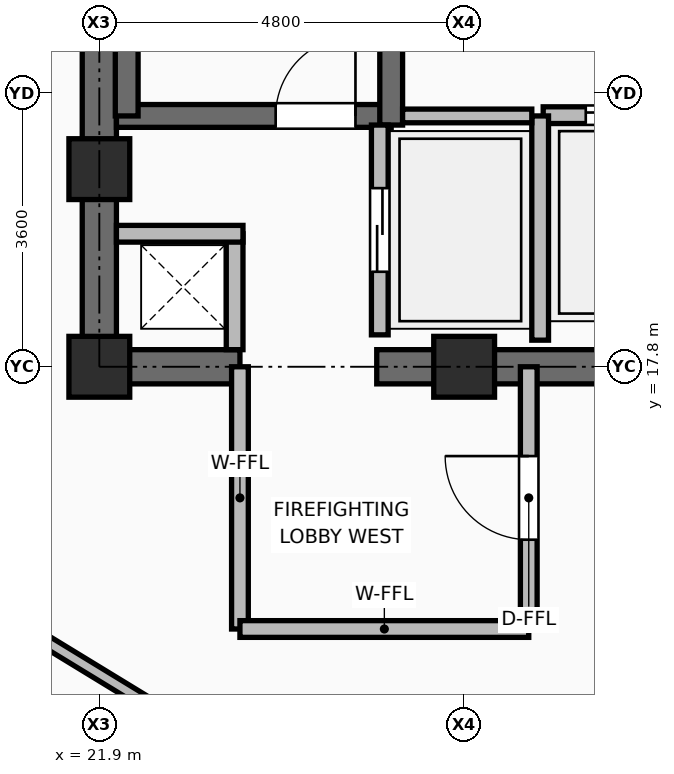
"""IFC4 building model, lengths in metres.
Left out: names, types, materials, properties, quantities, classifications, styles, units other than length and angle.
Written with IfcOpenShell. Run it as: python <this file> out.ifc"""

import sys

from ifc_helpers import new_model, si_unit, direction, frame, frame_2d, origin, origin_2d, place, context, subcontext, project, spatial, rectangle, extrude, element, fill, save


model = new_model("IFC4")
c1 = context("Model", 3, precision=1e-05, world=origin(), true_north=direction((0.0, 1.0)))
c2 = subcontext(c1, "Body", "Model", "MODEL_VIEW")
j1 = project(units=[si_unit("LENGTHUNIT", "METRE"), si_unit("PLANEANGLEUNIT", "RADIAN")], contexts=[c1])
p1 = place(None, origin())
s1 = spatial("IfcSite", under=j1, at=p1, CompositionType="ELEMENT")
p2 = place(p1, origin())
s2 = spatial("IfcBuilding", under=s1, at=p2, CompositionType="ELEMENT")
p3 = place(p2, frame((0.0, 0.0, 212.4)))
s3 = spatial("IfcBuildingStorey", under=s2, at=p3, CompositionType="ELEMENT", Elevation=212.4)
for number, where, z_axis, x_axis in (
    (1, (21.9, 17.8, 0.0), (0.0, 0.0, 1.0), (1.0, 0.0, 0.0)),
    (2, (26.7, 17.8, 0.0), (0.0, 0.0, 1.0), (1.0, 0.0, 0.0)),
    (3, (21.9, 20.4, 0.0), (0.0, 0.0, 1.0), (1.0, 0.0, 0.0)),
):
    element("IfcColumn", number, at=place(p3, frame(where, z_axis=z_axis, x_axis=x_axis)), inside=s3, PredefinedType="COLUMN", context=c2, shape_type="SweptSolid", body=[
        extrude(rectangle(XDim=0.8, YDim=0.8, at=origin_2d()), origin(), (0.0, 0.0, 1.0), 3.75),
    ])
p4 = place(p3, frame((21.675, 17.8, 0.0), z_axis=(0.0, 0.0, 1.0), x_axis=(1.0, 0.0, 0.0)))
e4 = element("IfcWall", 4, at=p4, inside=s3, PredefinedType="SHEAR", context=c2, shape_type="SweptSolid", body=[
    extrude(rectangle(XDim=2.075, YDim=0.45, at=frame_2d((1.038, 0.0))), origin(), (0.0, 0.0, 1.0), 3.57),
])
p5 = place(p3, frame((25.55, 17.8, 0.0), z_axis=(0.0, 0.0, 1.0), x_axis=(1.0, 0.0, 0.0)))
e5 = element("IfcWall", 5, at=p5, inside=s3, PredefinedType="SHEAR", context=c2, shape_type="SweptSolid", body=[
    extrude(rectangle(XDim=6.9, YDim=0.45, at=frame_2d((3.45, 0.0))), origin(), (0.0, 0.0, 1.0), 3.57),
])
p6 = place(p3, frame((21.9, 18.025, 0.0), z_axis=(0.0, 0.0, 1.0), x_axis=(0.0, 1.0, 0.0)))
e6 = element("IfcWall", 6, at=p6, inside=s3, PredefinedType="SHEAR", context=c2, shape_type="SweptSolid", body=[
    extrude(rectangle(XDim=14.2, YDim=0.45, at=frame_2d((7.1, 0.0))), origin(), (0.0, 0.0, 1.0), 3.57),
])
p7 = place(p3, frame((22.125, 21.1, 0.0), z_axis=(0.0, 0.0, 1.0), x_axis=(1.0, 0.0, 0.0)))
e7 = element("IfcWall", 7, at=p7, inside=s3, PredefinedType="SHEAR", context=c2, shape_type="SweptSolid", body=[
    extrude(rectangle(XDim=3.615, YDim=0.3, at=frame_2d((1.808, 0.0))), origin(), (0.0, 0.0, 1.0), 3.57),
])
p8 = place(p7, frame((2.095, 0.0, 0.0)))
e8 = element("IfcOpeningElement", 8, at=p8, cuts=e7, PredefinedType="OPENING", context=c2, shape_type="SweptSolid", body=[
    extrude(rectangle(XDim=1.05, YDim=2.1, at=frame_2d((0.525, 1.05))), frame((0.0, 0.16, 0.0), z_axis=(0.0, -1.0, 0.0), x_axis=(1.0, 0.0, 0.0)), (0.0, 0.0, 1.0), 0.32),
])
p9 = place(p3, frame((25.74, 20.98, 0.0), z_axis=(0.0, 0.0, 1.0), x_axis=(0.0, 1.0, 0.0)))
e9 = element("IfcWall", 9, at=p9, inside=s3, PredefinedType="SHEAR", context=c2, shape_type="SweptSolid", body=[
    extrude(rectangle(XDim=7.99, YDim=0.3, at=frame_2d((3.995, 0.0))), origin(), (0.0, 0.0, 1.0), 3.57),
])
p10 = place(p3, frame((22.26, 21.1, 0.0), z_axis=(0.0, 0.0, 1.0), x_axis=(0.0, 1.0, 0.0)))
e10 = element("IfcWall", 10, at=p10, inside=s3, PredefinedType="SHEAR", context=c2, shape_type="SweptSolid", body=[
    extrude(rectangle(XDim=7.75, YDim=0.3, at=frame_2d((3.875, 0.0))), origin(), (0.0, 0.0, 1.0), 3.57),
])
p11 = place(p3, frame((23.68, 18.025, 0.0), z_axis=(0.0, 0.0, 1.0), x_axis=(0.0, 1.0, 0.0)))
e11 = element("IfcWall", 11, at=p11, inside=s3, PredefinedType="PARTITIONING", context=c2, shape_type="SweptSolid", body=[
    extrude(rectangle(XDim=1.525, YDim=0.22, at=frame_2d((0.763, 0.0))), origin(), (0.0, 0.0, 1.0), 3.55),
])
p12 = place(p3, frame((22.125, 19.55, 0.0), z_axis=(0.0, 0.0, 1.0), x_axis=(1.0, 0.0, 0.0)))
e12 = element("IfcWall", 12, at=p12, inside=s3, PredefinedType="PARTITIONING", context=c2, shape_type="SweptSolid", body=[
    extrude(rectangle(XDim=1.665, YDim=0.22, at=frame_2d((0.833, 0.0))), origin(), (0.0, 0.0, 1.0), 2.595),
])
p13 = place(p3, frame((25.59, 18.22, 0.0), z_axis=(0.0, 0.0, 1.0), x_axis=(0.0, 1.0, 0.0)))
e13 = element("IfcWall", 13, at=p13, inside=s3, PredefinedType="PARTITIONING", context=c2, shape_type="SweptSolid", body=[
    extrude(rectangle(XDim=2.76, YDim=0.22, at=frame_2d((1.38, 0.0))), origin(), (0.0, 0.0, 1.0), 3.55),
])
p14 = place(p13, frame((0.83, 0.0, 0.0)))
e14 = element("IfcOpeningElement", 14, at=p14, cuts=e13, PredefinedType="OPENING", context=c2, shape_type="SweptSolid", body=[
    extrude(rectangle(XDim=1.1, YDim=2.2, at=frame_2d((0.55, 1.1))), frame((0.0, 0.12, 0.0), z_axis=(0.0, -1.0, 0.0), x_axis=(1.0, 0.0, 0.0)), (0.0, 0.0, 1.0), 0.24),
])
p15 = place(p3, frame((27.74, 21.11, 0.0), z_axis=(0.0, 0.0, 1.0), x_axis=(1.0, 0.0, 0.0)))
e15 = element("IfcWall", 15, at=p15, inside=s3, PredefinedType="PARTITIONING", context=c2, shape_type="SweptSolid", body=[
    extrude(rectangle(XDim=2.22, YDim=0.22, at=frame_2d((1.11, 0.0))), origin(), (0.0, 0.0, 1.0), 3.55),
])
p16 = place(p15, frame((0.56, 0.0, 0.0)))
e16 = element("IfcOpeningElement", 16, at=p16, cuts=e15, PredefinedType="OPENING", context=c2, shape_type="SweptSolid", body=[
    extrude(rectangle(XDim=1.1, YDim=2.2, at=frame_2d((0.55, 1.1))), frame((0.0, 0.12, 0.0), z_axis=(0.0, -1.0, 0.0), x_axis=(1.0, 0.0, 0.0)), (0.0, 0.0, 1.0), 0.24),
])
p17 = place(p3, frame((27.7, 18.15, 0.0), z_axis=(0.0, 0.0, 1.0), x_axis=(0.0, 1.0, 0.0)))
e17 = element("IfcWall", 17, at=p17, inside=s3, PredefinedType="PARTITIONING", context=c2, shape_type="SweptSolid", body=[
    extrude(rectangle(XDim=2.95, YDim=0.22, at=frame_2d((1.475, 0.0))), origin(), (0.0, 0.0, 1.0), 3.55),
])
p18 = place(p3, frame((25.89, 21.1, 0.0), z_axis=(0.0, 0.0, 1.0), x_axis=(1.0, 0.0, 0.0)))
e18 = element("IfcWall", 18, at=p18, inside=s3, PredefinedType="PARTITIONING", context=c2, shape_type="SweptSolid", body=[
    extrude(rectangle(XDim=1.7, YDim=0.18, at=frame_2d((0.85, 0.0))), origin(), (0.0, 0.0, 1.0), 3.55),
])
p19 = place(p3, frame((23.75, 14.35, 0.0), z_axis=(0.0, 0.0, 1.0), x_axis=(0.0, 1.0, 0.0)))
e19 = element("IfcWall", 19, at=p19, inside=s3, PredefinedType="PARTITIONING", context=c2, shape_type="SweptSolid", body=[
    extrude(rectangle(XDim=3.45, YDim=0.22, at=frame_2d((1.725, 0.0))), origin(), (0.0, 0.0, 1.0), 3.081),
])
p20 = place(p3, frame((23.75, 14.35, 0.0), z_axis=(0.0, 0.0, 1.0), x_axis=(1.0, 0.0, 0.0)))
e20 = element("IfcWall", 20, at=p20, inside=s3, PredefinedType="PARTITIONING", context=c2, shape_type="SweptSolid", body=[
    extrude(rectangle(XDim=3.8, YDim=0.22, at=frame_2d((1.9, 0.0))), origin(), (0.0, 0.0, 1.0), 3.55),
])
p21 = place(p3, frame((27.55, 14.35, 0.0), z_axis=(0.0, 0.0, 1.0), x_axis=(0.0, 1.0, 0.0)))
e21 = element("IfcWall", 21, at=p21, inside=s3, PredefinedType="PARTITIONING", context=c2, shape_type="SweptSolid", body=[
    extrude(rectangle(XDim=3.45, YDim=0.22, at=frame_2d((1.725, 0.0))), origin(), (0.0, 0.0, 1.0), 3.081),
])
p22 = place(p21, frame((1.175, 0.0, 0.0)))
e22 = element("IfcOpeningElement", 22, at=p22, cuts=e21, PredefinedType="OPENING", context=c2, shape_type="SweptSolid", body=[
    extrude(rectangle(XDim=1.1, YDim=2.1, at=frame_2d((0.55, 1.05))), frame((0.0, 0.12, 0.0), z_axis=(0.0, -1.0, 0.0), x_axis=(1.0, 0.0, 0.0)), (0.0, 0.0, 1.0), 0.24),
])
p23 = place(p3, frame((23.175, 12.981, 0.0), z_axis=(0.0, 0.0, 1.0), x_axis=(-0.853653362976, 0.520841565047, 0.0)))
e23 = element("IfcWall", 23, at=p23, inside=s3, PredefinedType="PARTITIONING", context=c2, shape_type="SweptSolid", body=[
    extrude(rectangle(XDim=2.744, YDim=0.16, at=frame_2d((1.372, 0.0))), origin(), (0.0, 0.0, 1.0), 3.081),
])
p24 = place(p8, origin())
e24 = element("IfcDoor", 24, at=p24, inside=s3, OperationType="SINGLE_SWING_RIGHT", PredefinedType="DOOR", context=c2, shape_type="SweptSolid", body=[
    extrude(rectangle(XDim=1.05, YDim=2.1, at=frame_2d((0.525, 1.05))), frame((0.0, 0.025, 0.0), z_axis=(0.0, -1.0, 0.0), x_axis=(1.0, 0.0, 0.0)), (0.0, 0.0, 1.0), 0.05),
])
fill(e8, e24)
p25 = place(p14, origin())
e25 = element("IfcDoor", 25, at=p25, inside=s3, OperationType="DOUBLE_DOOR_SLIDING", PredefinedType="DOOR", context=c2, shape_type="SweptSolid", body=[
    extrude(rectangle(XDim=1.1, YDim=2.2, at=frame_2d((0.55, 1.1))), frame((0.0, 0.025, 0.0), z_axis=(0.0, -1.0, 0.0), x_axis=(1.0, 0.0, 0.0)), (0.0, 0.0, 1.0), 0.05),
])
fill(e14, e25)
p26 = place(p16, origin())
e26 = element("IfcDoor", 26, at=p26, inside=s3, OperationType="DOUBLE_DOOR_SLIDING", PredefinedType="DOOR", context=c2, shape_type="SweptSolid", body=[
    extrude(rectangle(XDim=1.1, YDim=2.2, at=frame_2d((0.55, 1.1))), frame((0.0, 0.025, 0.0), z_axis=(0.0, -1.0, 0.0), x_axis=(1.0, 0.0, 0.0)), (0.0, 0.0, 1.0), 0.05),
])
fill(e16, e26)
p27 = place(p22, origin())
e27 = element("IfcDoor", 27, at=p27, inside=s3, OperationType="SINGLE_SWING_RIGHT", PredefinedType="DOOR", context=c2, shape_type="SweptSolid", body=[
    extrude(rectangle(XDim=1.1, YDim=2.1, at=frame_2d((0.55, 1.05))), frame((0.0, 0.025, 0.0), z_axis=(0.0, -1.0, 0.0), x_axis=(1.0, 0.0, 0.0)), (0.0, 0.0, 1.0), 0.05),
])
fill(e22, e27)
save(model, sys.argv[1])
